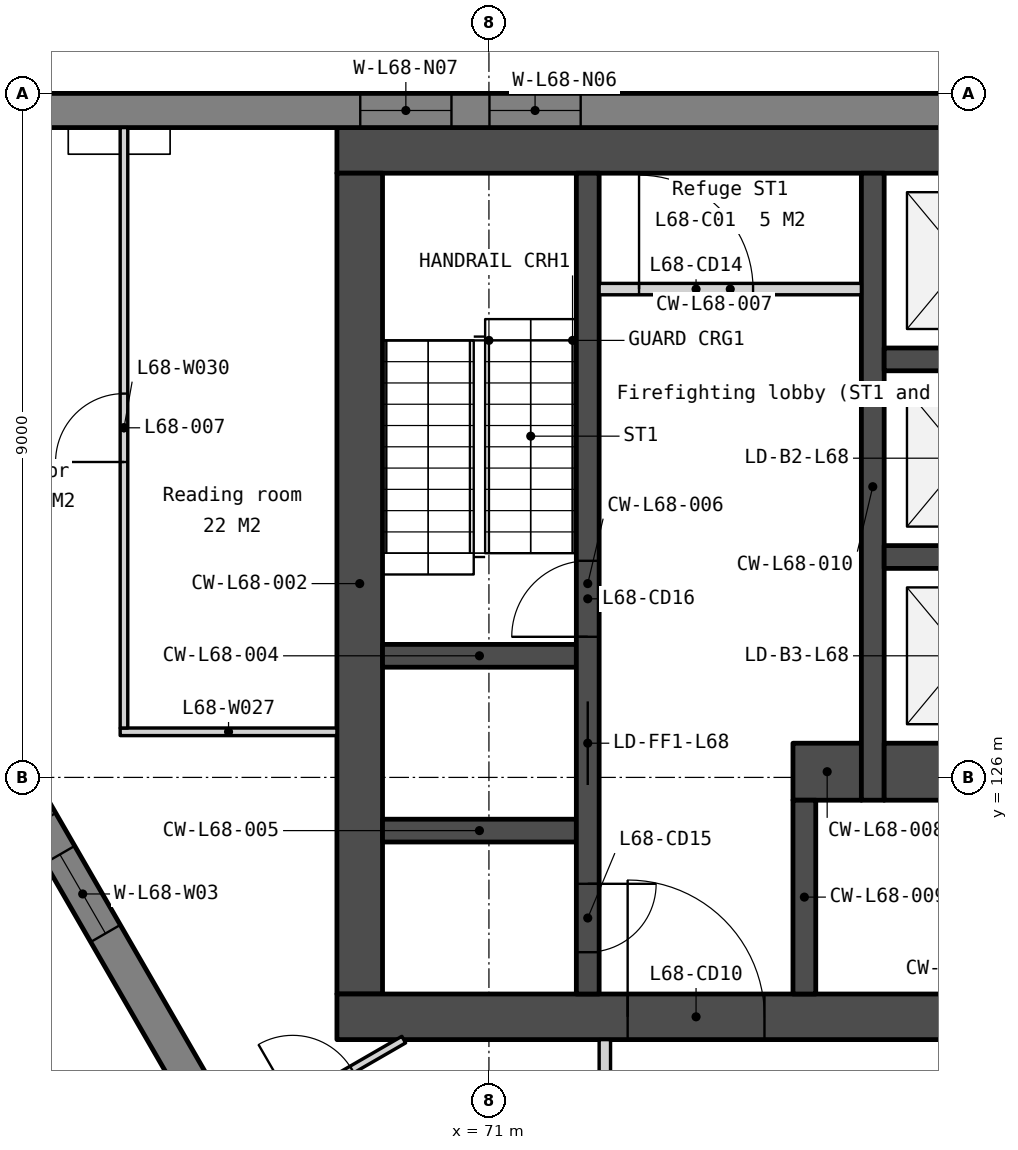
"""IFC4 building model, lengths in metres.
Left out: names, types, materials, properties, quantities, classifications, styles, units other than length and angle.
Written with IfcOpenShell. Run it as: python <this file> out.ifc"""

import sys

from ifc_helpers import new_model, si_unit, direction, frame, frame_2d, origin, place, context, subcontext, project, spatial, polyline, rectangle, outline, extrude, element, fill, save


model = new_model("IFC4")
c1 = context("Model", 3, precision=1e-05, world=origin(), true_north=direction((0.0, 1.0)))
c2 = subcontext(c1, "Body", "Model", "MODEL_VIEW")
j1 = project(units=[si_unit("LENGTHUNIT", "METRE"), si_unit("PLANEANGLEUNIT", "RADIAN")], contexts=[c1])
p1 = place(None, origin())
s1 = spatial("IfcSite", under=j1, at=p1, CompositionType="ELEMENT")
p2 = place(p1, origin())
s2 = spatial("IfcBuilding", under=s1, at=p2, CompositionType="ELEMENT")
p3 = place(p2, frame((0.0, 0.0, 277.7)))
s3 = spatial("IfcBuildingStorey", under=s2, at=p3, CompositionType="ELEMENT", Elevation=277.7)
p4 = place(p3, frame((69.0, 134.25, 0.0), z_axis=(0.0, 0.0, 1.0), x_axis=(1.0, 0.0, 0.0)))
e1 = element("IfcWall", 1, at=p4, inside=s3, PredefinedType="SOLIDWALL", context=c2, shape_type="SweptSolid", body=[
    extrude(rectangle(XDim=22.0, YDim=0.6, at=frame_2d((11.0, 0.0))), origin(), (0.0, 0.0, 1.0), 3.75),
])
p5 = place(p3, frame((69.3, 133.95, 0.0), z_axis=(0.0, 0.0, 1.0), x_axis=(0.0, -1.0, 0.0)))
e2 = element("IfcWall", 2, at=p5, inside=s3, PredefinedType="SOLIDWALL", context=c2, shape_type="SweptSolid", body=[
    extrude(rectangle(XDim=10.8, YDim=0.6, at=frame_2d((5.4, 0.0))), origin(), (0.0, 0.0, 1.0), 3.75),
])
p6 = place(p3, frame((69.0, 122.85, 0.0), z_axis=(0.0, 0.0, 1.0), x_axis=(1.0, 0.0, 0.0)))
e3 = element("IfcWall", 3, at=p6, inside=s3, PredefinedType="SOLIDWALL", context=c2, shape_type="SweptSolid", body=[
    extrude(rectangle(XDim=22.0, YDim=0.6, at=frame_2d((11.0, 0.0))), origin(), (0.0, 0.0, 1.0), 3.75),
])
p7 = place(p6, frame((16.375, 0.0, 0.0)))
e4 = element("IfcOpeningElement", 4, at=p7, cuts=e3, PredefinedType="OPENING", context=c2, shape_type="SweptSolid", body=[
    extrude(rectangle(XDim=1.8, YDim=2.1, at=frame_2d((0.9, 1.05))), frame((0.0, 0.31, 0.0), z_axis=(0.0, -1.0, 0.0), x_axis=(1.0, 0.0, 0.0)), (0.0, 0.0, 1.0), 0.62),
])
p8 = place(p6, frame((3.825, 0.0, 0.0)))
e5 = element("IfcOpeningElement", 5, at=p8, cuts=e3, PredefinedType="OPENING", context=c2, shape_type="SweptSolid", body=[
    extrude(rectangle(XDim=1.8, YDim=2.1, at=frame_2d((0.9, 1.05))), frame((0.0, 0.31, 0.0), z_axis=(0.0, -1.0, 0.0), x_axis=(1.0, 0.0, 0.0)), (0.0, 0.0, 1.0), 0.62),
])
p9 = place(p6, frame((12.85, 0.0, 0.0)))
e6 = element("IfcOpeningElement", 6, at=p9, cuts=e3, PredefinedType="OPENING", context=c2, shape_type="SweptSolid", body=[
    extrude(rectangle(XDim=1.5, YDim=2.1, at=frame_2d((0.75, 1.05))), frame((0.0, 0.31, 0.0), z_axis=(0.0, -1.0, 0.0), x_axis=(1.0, 0.0, 0.0)), (0.0, 0.0, 1.0), 0.62),
])
for number, where, z_axis, x_axis in (
    (7, (69.6, 127.6, 0.0), (0.0, 0.0, 1.0), (1.0, 0.0, 0.0)),
    (8, (69.6, 125.3, 0.0), (0.0, 0.0, 1.0), (1.0, 0.0, 0.0)),
):
    element("IfcWall", number, at=place(p3, frame(where, z_axis=z_axis, x_axis=x_axis)), inside=s3, PredefinedType="SOLIDWALL", context=c2, shape_type="SweptSolid", body=[
        extrude(rectangle(XDim=2.55, YDim=0.3, at=frame_2d((1.275, 0.0))), origin(), (0.0, 0.0, 1.0), 3.75),
    ])
p10 = place(p3, frame((72.3, 133.95, 0.0), z_axis=(0.0, 0.0, 1.0), x_axis=(0.0, -1.0, 0.0)))
e9 = element("IfcWall", 9, at=p10, inside=s3, PredefinedType="SOLIDWALL", context=c2, shape_type="SweptSolid", body=[
    extrude(rectangle(XDim=10.8, YDim=0.3, at=frame_2d((5.4, 0.0))), origin(), (0.0, 0.0, 1.0), 3.75),
])
p11 = place(p10, frame((6.95, 0.0, 0.0)))
e10 = element("IfcOpeningElement", 10, at=p11, cuts=e9, PredefinedType="OPENING", context=c2, shape_type="SweptSolid", body=[
    extrude(rectangle(XDim=1.1, YDim=2.1, at=frame_2d((0.55, 1.05))), frame((0.0, 0.16, 0.0), z_axis=(0.0, -1.0, 0.0), x_axis=(1.0, 0.0, 0.0)), (0.0, 0.0, 1.0), 0.32),
])
p12 = place(p10, frame((9.35, 0.0, 0.0)))
e11 = element("IfcOpeningElement", 11, at=p12, cuts=e9, PredefinedType="OPENING", context=c2, shape_type="SweptSolid", body=[
    extrude(rectangle(XDim=0.9, YDim=2.1, at=frame_2d((0.45, 1.05))), frame((0.0, 0.16, 0.0), z_axis=(0.0, -1.0, 0.0), x_axis=(1.0, 0.0, 0.0)), (0.0, 0.0, 1.0), 0.32),
])
p13 = place(p10, frame((5.1, 0.0, 0.0)))
e12 = element("IfcOpeningElement", 12, at=p13, cuts=e9, PredefinedType="OPENING", context=c2, shape_type="SweptSolid", body=[
    extrude(rectangle(XDim=1.0, YDim=2.1, at=frame_2d((0.5, 1.05))), frame((0.0, 0.16, 0.0), z_axis=(0.0, -1.0, 0.0), x_axis=(1.0, 0.0, 0.0)), (0.0, 0.0, 1.0), 0.32),
])
p14 = place(p3, frame((72.45, 132.425, 0.0), z_axis=(0.0, 0.0, 1.0), x_axis=(1.0, 0.0, 0.0)))
e13 = element("IfcWall", 13, at=p14, inside=s3, PredefinedType="PARTITIONING", context=c2, shape_type="SweptSolid", body=[
    extrude(rectangle(XDim=3.45, YDim=0.15, at=frame_2d((1.725, 0.0))), origin(), (0.0, 0.0, 1.0), 3.75),
])
p15 = place(p14, frame((0.525, 0.0, 0.0)))
e14 = element("IfcOpeningElement", 14, at=p15, cuts=e13, PredefinedType="OPENING", context=c2, shape_type="SweptSolid", body=[
    extrude(rectangle(XDim=1.5, YDim=2.1, at=frame_2d((0.75, 1.05))), frame((0.0, 0.085, 0.0), z_axis=(0.0, -1.0, 0.0), x_axis=(1.0, 0.0, 0.0)), (0.0, 0.0, 1.0), 0.17),
])
p16 = place(p3, frame((75.0, 126.075, 0.0), z_axis=(0.0, 0.0, 1.0), x_axis=(1.0, 0.0, 0.0)))
e15 = element("IfcWall", 15, at=p16, inside=s3, PredefinedType="SOLIDWALL", context=c2, shape_type="SweptSolid", body=[
    extrude(rectangle(XDim=0.9, YDim=0.75, at=frame_2d((0.45, 0.0))), origin(), (0.0, 0.0, 1.0), 3.75),
])
p17 = place(p3, frame((75.15, 125.7, 0.0), z_axis=(0.0, 0.0, 1.0), x_axis=(0.0, -1.0, 0.0)))
e16 = element("IfcWall", 16, at=p17, inside=s3, PredefinedType="SOLIDWALL", context=c2, shape_type="SweptSolid", body=[
    extrude(rectangle(XDim=2.55, YDim=0.3, at=frame_2d((1.275, 0.0))), origin(), (0.0, 0.0, 1.0), 3.75),
])
p18 = place(p3, frame((76.05, 133.95, 0.0), z_axis=(0.0, 0.0, 1.0), x_axis=(0.0, -1.0, 0.0)))
e17 = element("IfcWall", 17, at=p18, inside=s3, PredefinedType="SOLIDWALL", context=c2, shape_type="SweptSolid", body=[
    extrude(rectangle(XDim=8.25, YDim=0.3, at=frame_2d((4.125, 0.0))), origin(), (0.0, 0.0, 1.0), 3.75),
])
for number, where, z_axis, x_axis in (
    (18, (76.2, 131.5, 0.0), (0.0, 0.0, 1.0), (1.0, 0.0, 0.0)),
    (19, (76.2, 128.9, 0.0), (0.0, 0.0, 1.0), (1.0, 0.0, 0.0)),
):
    element("IfcWall", number, at=place(p3, frame(where, z_axis=z_axis, x_axis=x_axis)), inside=s3, PredefinedType="SOLIDWALL", context=c2, shape_type="SweptSolid", body=[
        extrude(rectangle(XDim=2.1, YDim=0.3, at=frame_2d((1.05, 0.0))), origin(), (0.0, 0.0, 1.0), 3.75),
    ])
p19 = place(p3, frame((76.2, 126.075, 0.0), z_axis=(0.0, 0.0, 1.0), x_axis=(1.0, 0.0, 0.0)))
e20 = element("IfcWall", 20, at=p19, inside=s3, PredefinedType="SOLIDWALL", context=c2, shape_type="SweptSolid", body=[
    extrude(rectangle(XDim=2.1, YDim=0.75, at=frame_2d((1.05, 0.0))), origin(), (0.0, 0.0, 1.0), 3.75),
])
p20 = place(p3, frame((98.486, 134.775, -0.15), z_axis=(0.0, 0.0, 1.0), x_axis=(-1.0, 0.0, 0.0)))
e21 = element("IfcWall", 21, at=p20, inside=s3, PredefinedType="SOLIDWALL", context=c2, shape_type="SweptSolid", body=[
    extrude(outline(polyline([(36.972, 0.0), (36.972, 3.9), (0.0, 3.9), (0.0, 0.0), (36.972, 0.0)])), frame((0.0, 0.225, 0.0), z_axis=(0.0, -1.0, 0.0), x_axis=(1.0, 0.0, 0.0)), (0.0, 0.0, 1.0), 0.45),
])
p21 = place(p20, frame((0.744, 0.0, 0.95)))
e22 = element("IfcOpeningElement", 22, at=p21, cuts=e21, PredefinedType="OPENING", context=c2, shape_type="SweptSolid", body=[
    extrude(rectangle(XDim=1.2, YDim=2.2, at=frame_2d((0.6, 1.1))), frame((0.0, 0.235, 0.0), z_axis=(0.0, -1.0, 0.0), x_axis=(1.0, 0.0, 0.0)), (0.0, 0.0, 1.0), 0.47),
])
p22 = place(p20, frame((7.793, 0.0, 0.95)))
e23 = element("IfcOpeningElement", 23, at=p22, cuts=e21, PredefinedType="OPENING", context=c2, shape_type="SweptSolid", body=[
    extrude(rectangle(XDim=1.2, YDim=2.2, at=frame_2d((0.6, 1.1))), frame((0.0, 0.235, 0.0), z_axis=(0.0, -1.0, 0.0), x_axis=(1.0, 0.0, 0.0)), (0.0, 0.0, 1.0), 0.47),
])
p23 = place(p20, frame((9.493, 0.0, 0.95)))
e24 = element("IfcOpeningElement", 24, at=p23, cuts=e21, PredefinedType="OPENING", context=c2, shape_type="SweptSolid", body=[
    extrude(rectangle(XDim=1.2, YDim=2.2, at=frame_2d((0.6, 1.1))), frame((0.0, 0.235, 0.0), z_axis=(0.0, -1.0, 0.0), x_axis=(1.0, 0.0, 0.0)), (0.0, 0.0, 1.0), 0.47),
])
p24 = place(p20, frame((17.036, 0.0, 0.95)))
e25 = element("IfcOpeningElement", 25, at=p24, cuts=e21, PredefinedType="OPENING", context=c2, shape_type="SweptSolid", body=[
    extrude(rectangle(XDim=1.2, YDim=2.2, at=frame_2d((0.6, 1.1))), frame((0.0, 0.235, 0.0), z_axis=(0.0, -1.0, 0.0), x_axis=(1.0, 0.0, 0.0)), (0.0, 0.0, 1.0), 0.47),
])
p25 = place(p20, frame((18.736, 0.0, 0.95)))
e26 = element("IfcOpeningElement", 26, at=p25, cuts=e21, PredefinedType="OPENING", context=c2, shape_type="SweptSolid", body=[
    extrude(rectangle(XDim=1.2, YDim=2.2, at=frame_2d((0.6, 1.1))), frame((0.0, 0.235, 0.0), z_axis=(0.0, -1.0, 0.0), x_axis=(1.0, 0.0, 0.0)), (0.0, 0.0, 1.0), 0.47),
])
p26 = place(p20, frame((26.279, 0.0, 0.95)))
e27 = element("IfcOpeningElement", 27, at=p26, cuts=e21, PredefinedType="OPENING", context=c2, shape_type="SweptSolid", body=[
    extrude(rectangle(XDim=1.2, YDim=2.2, at=frame_2d((0.6, 1.1))), frame((0.0, 0.235, 0.0), z_axis=(0.0, -1.0, 0.0), x_axis=(1.0, 0.0, 0.0)), (0.0, 0.0, 1.0), 0.47),
])
p27 = place(p20, frame((27.979, 0.0, 0.95)))
e28 = element("IfcOpeningElement", 28, at=p27, cuts=e21, PredefinedType="OPENING", context=c2, shape_type="SweptSolid", body=[
    extrude(rectangle(XDim=1.2, YDim=2.2, at=frame_2d((0.6, 1.1))), frame((0.0, 0.235, 0.0), z_axis=(0.0, -1.0, 0.0), x_axis=(1.0, 0.0, 0.0)), (0.0, 0.0, 1.0), 0.47),
])
p28 = place(p20, frame((35.028, 0.0, 0.95)))
e29 = element("IfcOpeningElement", 29, at=p28, cuts=e21, PredefinedType="OPENING", context=c2, shape_type="SweptSolid", body=[
    extrude(rectangle(XDim=1.2, YDim=2.2, at=frame_2d((0.6, 1.1))), frame((0.0, 0.235, 0.0), z_axis=(0.0, -1.0, 0.0), x_axis=(1.0, 0.0, 0.0)), (0.0, 0.0, 1.0), 0.47),
])
p29 = place(p3, frame((60.609, 133.207, -0.15), z_axis=(0.0, 0.0, 1.0), x_axis=(0.500002536638, -0.866023939251, 0.0)))
e30 = element("IfcWall", 30, at=p29, inside=s3, PredefinedType="SOLIDWALL", context=c2, shape_type="SweptSolid", body=[
    extrude(outline(polyline([(36.972, 0.0), (36.972, 3.9), (0.0, 3.9), (0.0, 0.0), (36.972, 0.0)])), frame((0.0, 0.225, 0.0), z_axis=(0.0, -1.0, 0.0), x_axis=(1.0, 0.0, 0.0)), (0.0, 0.0, 1.0), 0.45),
])
p30 = place(p29, frame((0.744, 0.0, 0.95)))
e31 = element("IfcOpeningElement", 31, at=p30, cuts=e30, PredefinedType="OPENING", context=c2, shape_type="SweptSolid", body=[
    extrude(rectangle(XDim=1.2, YDim=2.2, at=frame_2d((0.6, 1.1))), frame((0.0, 0.235, 0.0), z_axis=(0.0, -1.0, 0.0), x_axis=(1.0, 0.0, 0.0)), (0.0, 0.0, 1.0), 0.47),
])
p31 = place(p29, frame((7.793, 0.0, 0.95)))
e32 = element("IfcOpeningElement", 32, at=p31, cuts=e30, PredefinedType="OPENING", context=c2, shape_type="SweptSolid", body=[
    extrude(rectangle(XDim=1.2, YDim=2.2, at=frame_2d((0.6, 1.1))), frame((0.0, 0.235, 0.0), z_axis=(0.0, -1.0, 0.0), x_axis=(1.0, 0.0, 0.0)), (0.0, 0.0, 1.0), 0.47),
])
p32 = place(p29, frame((9.493, 0.0, 0.95)))
e33 = element("IfcOpeningElement", 33, at=p32, cuts=e30, PredefinedType="OPENING", context=c2, shape_type="SweptSolid", body=[
    extrude(rectangle(XDim=1.2, YDim=2.2, at=frame_2d((0.6, 1.1))), frame((0.0, 0.235, 0.0), z_axis=(0.0, -1.0, 0.0), x_axis=(1.0, 0.0, 0.0)), (0.0, 0.0, 1.0), 0.47),
])
p33 = place(p29, frame((17.036, 0.0, 0.95)))
e34 = element("IfcOpeningElement", 34, at=p33, cuts=e30, PredefinedType="OPENING", context=c2, shape_type="SweptSolid", body=[
    extrude(rectangle(XDim=1.2, YDim=2.2, at=frame_2d((0.6, 1.1))), frame((0.0, 0.235, 0.0), z_axis=(0.0, -1.0, 0.0), x_axis=(1.0, 0.0, 0.0)), (0.0, 0.0, 1.0), 0.47),
])
p34 = place(p29, frame((18.736, 0.0, 0.95)))
e35 = element("IfcOpeningElement", 35, at=p34, cuts=e30, PredefinedType="OPENING", context=c2, shape_type="SweptSolid", body=[
    extrude(rectangle(XDim=1.2, YDim=2.2, at=frame_2d((0.6, 1.1))), frame((0.0, 0.235, 0.0), z_axis=(0.0, -1.0, 0.0), x_axis=(1.0, 0.0, 0.0)), (0.0, 0.0, 1.0), 0.47),
])
p35 = place(p29, frame((26.279, 0.0, 0.95)))
e36 = element("IfcOpeningElement", 36, at=p35, cuts=e30, PredefinedType="OPENING", context=c2, shape_type="SweptSolid", body=[
    extrude(rectangle(XDim=1.2, YDim=2.2, at=frame_2d((0.6, 1.1))), frame((0.0, 0.235, 0.0), z_axis=(0.0, -1.0, 0.0), x_axis=(1.0, 0.0, 0.0)), (0.0, 0.0, 1.0), 0.47),
])
p36 = place(p29, frame((27.979, 0.0, 0.95)))
e37 = element("IfcOpeningElement", 37, at=p36, cuts=e30, PredefinedType="OPENING", context=c2, shape_type="SweptSolid", body=[
    extrude(rectangle(XDim=1.2, YDim=2.2, at=frame_2d((0.6, 1.1))), frame((0.0, 0.235, 0.0), z_axis=(0.0, -1.0, 0.0), x_axis=(1.0, 0.0, 0.0)), (0.0, 0.0, 1.0), 0.47),
])
p37 = place(p29, frame((35.028, 0.0, 0.95)))
e38 = element("IfcOpeningElement", 38, at=p37, cuts=e30, PredefinedType="OPENING", context=c2, shape_type="SweptSolid", body=[
    extrude(rectangle(XDim=1.2, YDim=2.2, at=frame_2d((0.6, 1.1))), frame((0.0, 0.235, 0.0), z_axis=(0.0, -1.0, 0.0), x_axis=(1.0, 0.0, 0.0)), (0.0, 0.0, 1.0), 0.47),
])
p38 = place(p3, frame((72.525, 119.875, 0.0), z_axis=(0.0, 0.0, 1.0), x_axis=(0.0, 1.0, 0.0)))
e39 = element("IfcWall", 39, at=p38, inside=s3, PredefinedType="PARTITIONING", context=c2, shape_type="SweptSolid", body=[
    extrude(rectangle(XDim=2.675, YDim=0.15, at=frame_2d((1.337, 0.0))), origin(), (0.0, 0.0, 1.0), 3.75),
])
p39 = place(p38, frame((0.837, 0.0, 0.0)))
e40 = element("IfcOpeningElement", 40, at=p39, cuts=e39, PredefinedType="OPENING", context=c2, shape_type="SweptSolid", body=[
    extrude(rectangle(XDim=1.0, YDim=2.1, at=frame_2d((0.5, 1.05))), frame((0.0, 0.085, 0.0), z_axis=(0.0, -1.0, 0.0), x_axis=(1.0, 0.0, 0.0)), (0.0, 0.0, 1.0), 0.17),
])
p40 = place(p3, frame((67.736, 121.313, 0.0), z_axis=(0.0, 0.0, 1.0), x_axis=(0.86604923931, 0.499958713387, 0.0)))
e41 = element("IfcWall", 41, at=p40, inside=s3, PredefinedType="PARTITIONING", context=c2, shape_type="SweptSolid", body=[
    extrude(rectangle(XDim=2.475, YDim=0.1, at=frame_2d((1.237, 0.0))), origin(), (0.0, 0.0, 1.0), 3.75),
])
p41 = place(p40, frame((0.787, 0.0, 0.0)))
e42 = element("IfcOpeningElement", 42, at=p41, cuts=e41, PredefinedType="OPENING", context=c2, shape_type="SweptSolid", body=[
    extrude(rectangle(XDim=0.9, YDim=2.1, at=frame_2d((0.45, 1.05))), frame((0.0, 0.06, 0.0), z_axis=(0.0, -1.0, 0.0), x_axis=(1.0, 0.0, 0.0)), (0.0, 0.0, 1.0), 0.12),
])
p42 = place(p3, frame((66.148, 126.6, 0.0), z_axis=(0.0, 0.0, 1.0), x_axis=(1.0, 0.0, 0.0)))
e43 = element("IfcWall", 43, at=p42, inside=s3, PredefinedType="PARTITIONING", context=c2, shape_type="SweptSolid", body=[
    extrude(rectangle(XDim=2.852, YDim=0.1, at=frame_2d((1.426, 0.0))), origin(), (0.0, 0.0, 1.0), 3.75),
])
p43 = place(p3, frame((66.198, 126.65, 0.0), z_axis=(0.0, 0.0, 1.0), x_axis=(0.0, 1.0, 0.0)))
e44 = element("IfcWall", 44, at=p43, inside=s3, PredefinedType="PARTITIONING", context=c2, shape_type="SweptSolid", body=[
    extrude(rectangle(XDim=7.9, YDim=0.1, at=frame_2d((3.95, 0.0))), origin(), (0.0, 0.0, 1.0), 3.75),
])
p44 = place(p43, frame((3.5, 0.0, 0.0)))
e45 = element("IfcOpeningElement", 45, at=p44, cuts=e44, PredefinedType="OPENING", context=c2, shape_type="SweptSolid", body=[
    extrude(rectangle(XDim=0.9, YDim=2.1, at=frame_2d((0.45, 1.05))), frame((0.0, 0.06, 0.0), z_axis=(0.0, -1.0, 0.0), x_axis=(1.0, 0.0, 0.0)), (0.0, 0.0, 1.0), 0.12),
])
p45 = place(p11, origin())
e46 = element("IfcDoor", 46, at=p45, inside=s3, OperationType="SLIDING_TO_LEFT", PredefinedType="DOOR", context=c2, shape_type="SweptSolid", body=[
    extrude(rectangle(XDim=1.1, YDim=2.1, at=frame_2d((0.55, 1.05))), frame((0.0, 0.025, 0.0), z_axis=(0.0, -1.0, 0.0), x_axis=(1.0, 0.0, 0.0)), (0.0, 0.0, 1.0), 0.05),
])
fill(e10, e46)
p46 = place(p8, origin())
e47 = element("IfcDoor", 47, at=p46, inside=s3, OperationType="DOUBLE_DOOR_DOUBLE_SWING", PredefinedType="DOOR", context=c2, shape_type="SweptSolid", body=[
    extrude(rectangle(XDim=1.8, YDim=2.1, at=frame_2d((0.9, 1.05))), frame((0.0, 0.025, 0.0), z_axis=(0.0, -1.0, 0.0), x_axis=(1.0, 0.0, 0.0)), (0.0, 0.0, 1.0), 0.05),
])
fill(e5, e47)
p47 = place(p15, origin())
e48 = element("IfcDoor", 48, at=p47, inside=s3, OperationType="DOUBLE_DOOR_DOUBLE_SWING", PredefinedType="DOOR", context=c2, shape_type="SweptSolid", body=[
    extrude(rectangle(XDim=1.5, YDim=2.1, at=frame_2d((0.75, 1.05))), frame((0.0, 0.025, 0.0), z_axis=(0.0, -1.0, 0.0), x_axis=(1.0, 0.0, 0.0)), (0.0, 0.0, 1.0), 0.05),
])
fill(e14, e48)
p48 = place(p12, origin())
e49 = element("IfcDoor", 49, at=p48, inside=s3, OperationType="SINGLE_SWING_LEFT", PredefinedType="DOOR", context=c2, shape_type="SweptSolid", body=[
    extrude(rectangle(XDim=0.9, YDim=2.1, at=frame_2d((0.45, 1.05))), frame((0.0, 0.025, 0.0), z_axis=(0.0, -1.0, 0.0), x_axis=(1.0, 0.0, 0.0)), (0.0, 0.0, 1.0), 0.05),
])
fill(e11, e49)
p49 = place(p13, origin())
e50 = element("IfcDoor", 50, at=p49, inside=s3, OperationType="SINGLE_SWING_RIGHT", PredefinedType="DOOR", context=c2, shape_type="SweptSolid", body=[
    extrude(rectangle(XDim=1.0, YDim=2.1, at=frame_2d((0.5, 1.05))), frame((0.0, 0.025, 0.0), z_axis=(0.0, -1.0, 0.0), x_axis=(1.0, 0.0, 0.0)), (0.0, 0.0, 1.0), 0.05),
])
fill(e12, e50)
p50 = place(p26, origin())
e51 = element("IfcWindow", 51, at=p50, inside=s3, PartitioningType="SINGLE_PANEL", PredefinedType="WINDOW", context=c2, shape_type="SweptSolid", body=[
    extrude(rectangle(XDim=1.2, YDim=2.2, at=frame_2d((0.6, 1.1))), frame((0.0, 0.03, 0.0), z_axis=(0.0, -1.0, 0.0), x_axis=(1.0, 0.0, 0.0)), (0.0, 0.0, 1.0), 0.06),
])
fill(e27, e51)
p51 = place(p27, origin())
e52 = element("IfcWindow", 52, at=p51, inside=s3, PartitioningType="SINGLE_PANEL", PredefinedType="WINDOW", context=c2, shape_type="SweptSolid", body=[
    extrude(rectangle(XDim=1.2, YDim=2.2, at=frame_2d((0.6, 1.1))), frame((0.0, 0.03, 0.0), z_axis=(0.0, -1.0, 0.0), x_axis=(1.0, 0.0, 0.0)), (0.0, 0.0, 1.0), 0.06),
])
fill(e28, e52)
p52 = place(p32, origin())
e53 = element("IfcWindow", 53, at=p52, inside=s3, PartitioningType="SINGLE_PANEL", PredefinedType="WINDOW", context=c2, shape_type="SweptSolid", body=[
    extrude(rectangle(XDim=1.2, YDim=2.2, at=frame_2d((0.6, 1.1))), frame((0.0, 0.03, 0.0), z_axis=(0.0, -1.0, 0.0), x_axis=(1.0, 0.0, 0.0)), (0.0, 0.0, 1.0), 0.06),
])
fill(e33, e53)
p53 = place(p44, origin())
e54 = element("IfcDoor", 54, at=p53, inside=s3, OperationType="SINGLE_SWING_LEFT", PredefinedType="DOOR", context=c2, shape_type="SweptSolid", body=[
    extrude(rectangle(XDim=0.9, YDim=2.1, at=frame_2d((0.45, 1.05))), frame((0.0, 0.025, 0.0), z_axis=(0.0, -1.0, 0.0), x_axis=(1.0, 0.0, 0.0)), (0.0, 0.0, 1.0), 0.05),
])
fill(e45, e54)
p54 = place(p41, origin())
e55 = element("IfcDoor", 55, at=p54, inside=s3, OperationType="SINGLE_SWING_LEFT", PredefinedType="DOOR", context=c2, shape_type="SweptSolid", body=[
    extrude(rectangle(XDim=0.9, YDim=2.1, at=frame_2d((0.45, 1.05))), frame((0.0, 0.025, 0.0), z_axis=(0.0, -1.0, 0.0), x_axis=(1.0, 0.0, 0.0)), (0.0, 0.0, 1.0), 0.05),
])
fill(e42, e55)
save(model, sys.argv[1])
